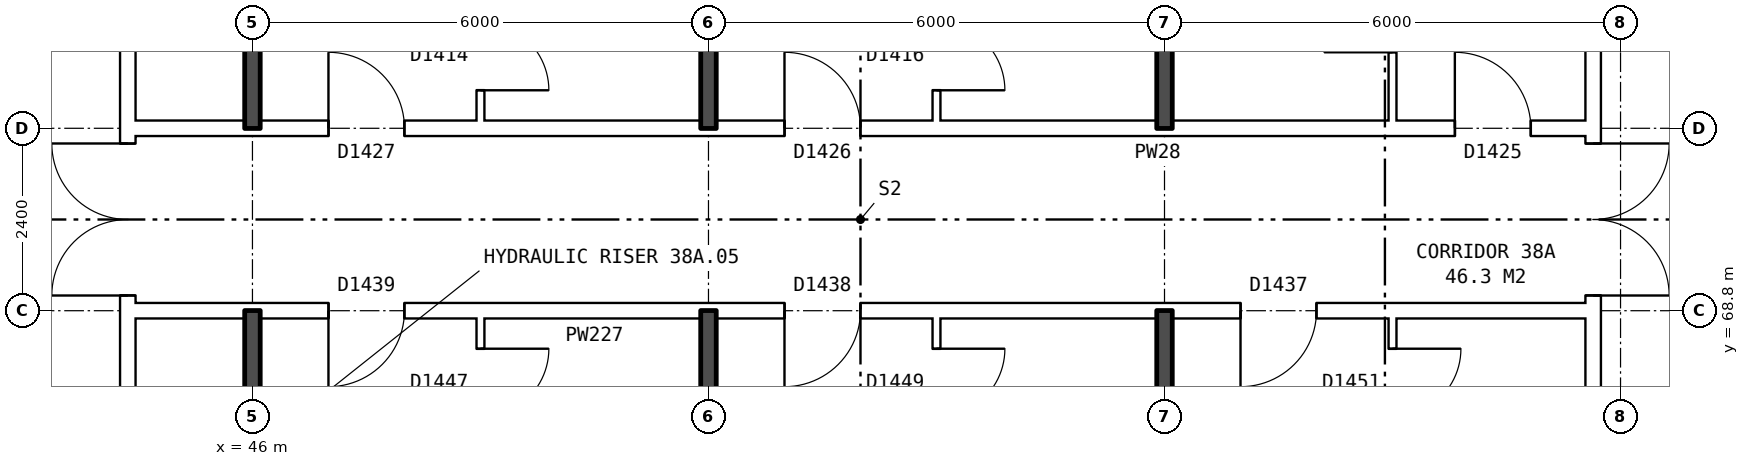
"""IFC4 building model, lengths in metres.
Left out: names, types, materials, properties, quantities, classifications, styles, units other than length and angle.
Written with IfcOpenShell. Run it as: python <this file> out.ifc"""

import sys

from ifc_helpers import new_model, si_unit, direction, frame, frame_2d, origin, place, context, subcontext, project, spatial, rectangle, extrude, element, fill, save


model = new_model("IFC4")
c1 = context("Model", 3, precision=1e-05, world=origin(), true_north=direction((0.0, 1.0)))
c2 = subcontext(c1, "Body", "Model", "MODEL_VIEW")
j1 = project(units=[si_unit("LENGTHUNIT", "METRE"), si_unit("PLANEANGLEUNIT", "RADIAN")], contexts=[c1])
p1 = place(None, origin())
s1 = spatial("IfcSite", under=j1, at=p1, CompositionType="ELEMENT")
p2 = place(p1, origin())
s2 = spatial("IfcBuilding", under=s1, at=p2, CompositionType="ELEMENT")
p3 = place(p2, frame((0.0, 0.0, 136.1)))
s3 = spatial("IfcBuildingStorey", under=s2, at=p3, CompositionType="ELEMENT", Elevation=136.1)
p4 = place(p3, frame((63.64, 63.9, 0.0), z_axis=(0.0, 0.0, 1.0), x_axis=(0.0, 1.0, 0.0)))
e1 = element("IfcWall", 1, at=p4, inside=s3, PredefinedType="PARTITIONING", context=c2, shape_type="SweptSolid", body=[
    extrude(rectangle(XDim=12.2, YDim=0.2, at=frame_2d((6.1, 0.0))), origin(), (0.0, 0.0, 1.0), 2.85),
])
p5 = place(p4, frame((5.1, 0.0, 0.0)))
e2 = element("IfcOpeningElement", 2, at=p5, cuts=e1, PredefinedType="OPENING", context=c2, shape_type="SweptSolid", body=[
    extrude(rectangle(XDim=2.0, YDim=2.1, at=frame_2d((1.0, 1.05))), frame((0.0, 0.11, 0.0), z_axis=(0.0, -1.0, 0.0), x_axis=(1.0, 0.0, 0.0)), (0.0, 0.0, 1.0), 0.22),
])
p6 = place(p3, frame((44.36, 63.9, 0.0), z_axis=(0.0, 0.0, 1.0), x_axis=(0.0, 1.0, 0.0)))
e3 = element("IfcWall", 3, at=p6, inside=s3, PredefinedType="PARTITIONING", context=c2, shape_type="SweptSolid", body=[
    extrude(rectangle(XDim=12.2, YDim=0.2, at=frame_2d((6.1, 0.0))), origin(), (0.0, 0.0, 1.0), 2.85),
])
p7 = place(p6, frame((5.1, 0.0, 0.0)))
e4 = element("IfcOpeningElement", 4, at=p7, cuts=e3, PredefinedType="OPENING", context=c2, shape_type="SweptSolid", body=[
    extrude(rectangle(XDim=2.0, YDim=2.1, at=frame_2d((1.0, 1.05))), frame((0.0, 0.11, 0.0), z_axis=(0.0, -1.0, 0.0), x_axis=(1.0, 0.0, 0.0)), (0.0, 0.0, 1.0), 0.22),
])
p8 = place(p3, frame((44.36, 68.8, 0.0), z_axis=(0.0, 0.0, 1.0), x_axis=(1.0, 0.0, 0.0)))
e5 = element("IfcWall", 5, at=p8, inside=s3, PredefinedType="PARTITIONING", context=c2, shape_type="SweptSolid", body=[
    extrude(rectangle(XDim=19.28, YDim=0.2, at=frame_2d((9.64, 0.0))), origin(), (0.0, 0.0, 1.0), 2.85),
])
p9 = place(p8, frame((14.64, 0.0, 0.0)))
e6 = element("IfcOpeningElement", 6, at=p9, cuts=e5, PredefinedType="OPENING", context=c2, shape_type="SweptSolid", body=[
    extrude(rectangle(XDim=1.0, YDim=2.1, at=frame_2d((0.5, 1.05))), frame((0.0, 0.11, 0.0), z_axis=(0.0, -1.0, 0.0), x_axis=(1.0, 0.0, 0.0)), (0.0, 0.0, 1.0), 0.22),
])
p10 = place(p8, frame((8.64, 0.0, 0.0)))
e7 = element("IfcOpeningElement", 7, at=p10, cuts=e5, PredefinedType="OPENING", context=c2, shape_type="SweptSolid", body=[
    extrude(rectangle(XDim=1.0, YDim=2.1, at=frame_2d((0.5, 1.05))), frame((0.0, 0.11, 0.0), z_axis=(0.0, -1.0, 0.0), x_axis=(1.0, 0.0, 0.0)), (0.0, 0.0, 1.0), 0.22),
])
p11 = place(p8, frame((2.64, 0.0, 0.0)))
e8 = element("IfcOpeningElement", 8, at=p11, cuts=e5, PredefinedType="OPENING", context=c2, shape_type="SweptSolid", body=[
    extrude(rectangle(XDim=1.0, YDim=2.1, at=frame_2d((0.5, 1.05))), frame((0.0, 0.11, 0.0), z_axis=(0.0, -1.0, 0.0), x_axis=(1.0, 0.0, 0.0)), (0.0, 0.0, 1.0), 0.22),
])
p12 = place(p3, frame((44.36, 71.2, 0.0), z_axis=(0.0, 0.0, 1.0), x_axis=(1.0, 0.0, 0.0)))
e9 = element("IfcWall", 9, at=p12, inside=s3, PredefinedType="PARTITIONING", context=c2, shape_type="SweptSolid", body=[
    extrude(rectangle(XDim=19.28, YDim=0.2, at=frame_2d((9.64, 0.0))), origin(), (0.0, 0.0, 1.0), 2.85),
])
p13 = place(p12, frame((17.46, 0.0, 0.0)))
e10 = element("IfcOpeningElement", 10, at=p13, cuts=e9, PredefinedType="OPENING", context=c2, shape_type="SweptSolid", body=[
    extrude(rectangle(XDim=1.0, YDim=2.1, at=frame_2d((0.5, 1.05))), frame((0.0, 0.11, 0.0), z_axis=(0.0, -1.0, 0.0), x_axis=(1.0, 0.0, 0.0)), (0.0, 0.0, 1.0), 0.22),
])
p14 = place(p12, frame((8.64, 0.0, 0.0)))
e11 = element("IfcOpeningElement", 11, at=p14, cuts=e9, PredefinedType="OPENING", context=c2, shape_type="SweptSolid", body=[
    extrude(rectangle(XDim=1.0, YDim=2.1, at=frame_2d((0.5, 1.05))), frame((0.0, 0.11, 0.0), z_axis=(0.0, -1.0, 0.0), x_axis=(1.0, 0.0, 0.0)), (0.0, 0.0, 1.0), 0.22),
])
p15 = place(p12, frame((2.64, 0.0, 0.0)))
e12 = element("IfcOpeningElement", 12, at=p15, cuts=e9, PredefinedType="OPENING", context=c2, shape_type="SweptSolid", body=[
    extrude(rectangle(XDim=1.0, YDim=2.1, at=frame_2d((0.5, 1.05))), frame((0.0, 0.11, 0.0), z_axis=(0.0, -1.0, 0.0), x_axis=(1.0, 0.0, 0.0)), (0.0, 0.0, 1.0), 0.22),
])
for number, where, z_axis, x_axis in (
    (13, (46.0, 63.8, 0.0), (0.0, 0.0, 1.0), (0.0, 1.0, 0.0)),
    (14, (46.0, 71.2, 0.0), (0.0, 0.0, 1.0), (0.0, 1.0, 0.0)),
):
    element("IfcWall", number, at=place(p3, frame(where, z_axis=z_axis, x_axis=x_axis)), inside=s3, PredefinedType="SOLIDWALL", context=c2, shape_type="SweptSolid", body=[
        extrude(rectangle(XDim=5.0, YDim=0.2, at=frame_2d((2.5, 0.0))), origin(), (0.0, 0.0, 1.0), 2.85),
    ])
p16 = place(p3, frame((49.0, 54.36, 0.0), z_axis=(0.0, 0.0, 1.0), x_axis=(0.0, 1.0, 0.0)))
e15 = element("IfcWall", 15, at=p16, inside=s3, PredefinedType="PARTITIONING", context=c2, shape_type="SweptSolid", body=[
    extrude(rectangle(XDim=14.34, YDim=0.1, at=frame_2d((7.17, 0.0))), origin(), (0.0, 0.0, 1.0), 2.85),
])
p17 = place(p16, frame((6.7, 0.0, 0.0)))
e16 = element("IfcOpeningElement", 16, at=p17, cuts=e15, PredefinedType="OPENING", context=c2, shape_type="SweptSolid", body=[
    extrude(rectangle(XDim=0.9, YDim=2.1, at=frame_2d((0.45, 1.05))), frame((0.0, 0.06, 0.0), z_axis=(0.0, -1.0, 0.0), x_axis=(1.0, 0.0, 0.0)), (0.0, 0.0, 1.0), 0.12),
])
p18 = place(p16, frame((13.04, 0.0, 0.0)))
e17 = element("IfcOpeningElement", 17, at=p18, cuts=e15, PredefinedType="OPENING", context=c2, shape_type="SweptSolid", body=[
    extrude(rectangle(XDim=0.9, YDim=2.1, at=frame_2d((0.45, 1.05))), frame((0.0, 0.06, 0.0), z_axis=(0.0, -1.0, 0.0), x_axis=(1.0, 0.0, 0.0)), (0.0, 0.0, 1.0), 0.12),
])
p19 = place(p3, frame((49.0, 71.3, 0.0), z_axis=(0.0, 0.0, 1.0), x_axis=(0.0, 1.0, 0.0)))
e18 = element("IfcWall", 18, at=p19, inside=s3, PredefinedType="PARTITIONING", context=c2, shape_type="SweptSolid", body=[
    extrude(rectangle(XDim=14.34, YDim=0.1, at=frame_2d((7.17, 0.0))), origin(), (0.0, 0.0, 1.0), 2.85),
])
p20 = place(p19, frame((7.94, 0.0, 0.0)))
e19 = element("IfcOpeningElement", 19, at=p20, cuts=e18, PredefinedType="OPENING", context=c2, shape_type="SweptSolid", body=[
    extrude(rectangle(XDim=0.9, YDim=2.1, at=frame_2d((0.45, 1.05))), frame((0.0, 0.06, 0.0), z_axis=(0.0, -1.0, 0.0), x_axis=(1.0, 0.0, 0.0)), (0.0, 0.0, 1.0), 0.12),
])
p21 = place(p19, frame((0.4, 0.0, 0.0)))
e20 = element("IfcOpeningElement", 20, at=p21, cuts=e18, PredefinedType="OPENING", context=c2, shape_type="SweptSolid", body=[
    extrude(rectangle(XDim=0.9, YDim=2.1, at=frame_2d((0.45, 1.05))), frame((0.0, 0.06, 0.0), z_axis=(0.0, -1.0, 0.0), x_axis=(1.0, 0.0, 0.0)), (0.0, 0.0, 1.0), 0.12),
])
for number, where, z_axis, x_axis in (
    (21, (52.0, 54.36, 0.0), (0.0, 0.0, 1.0), (0.0, 1.0, 0.0)),
    (22, (52.0, 71.2, 0.0), (0.0, 0.0, 1.0), (0.0, 1.0, 0.0)),
):
    element("IfcWall", number, at=place(p3, frame(where, z_axis=z_axis, x_axis=x_axis)), inside=s3, PredefinedType="SOLIDWALL", context=c2, shape_type="SweptSolid", body=[
        extrude(rectangle(XDim=14.44, YDim=0.2, at=frame_2d((7.22, 0.0))), origin(), (0.0, 0.0, 1.0), 2.85),
    ])
p22 = place(p3, frame((55.0, 54.36, 0.0), z_axis=(0.0, 0.0, 1.0), x_axis=(0.0, 1.0, 0.0)))
e23 = element("IfcWall", 23, at=p22, inside=s3, PredefinedType="PARTITIONING", context=c2, shape_type="SweptSolid", body=[
    extrude(rectangle(XDim=14.34, YDim=0.1, at=frame_2d((7.17, 0.0))), origin(), (0.0, 0.0, 1.0), 2.85),
])
p23 = place(p22, frame((6.7, 0.0, 0.0)))
e24 = element("IfcOpeningElement", 24, at=p23, cuts=e23, PredefinedType="OPENING", context=c2, shape_type="SweptSolid", body=[
    extrude(rectangle(XDim=0.9, YDim=2.1, at=frame_2d((0.45, 1.05))), frame((0.0, 0.06, 0.0), z_axis=(0.0, -1.0, 0.0), x_axis=(1.0, 0.0, 0.0)), (0.0, 0.0, 1.0), 0.12),
])
p24 = place(p22, frame((13.04, 0.0, 0.0)))
e25 = element("IfcOpeningElement", 25, at=p24, cuts=e23, PredefinedType="OPENING", context=c2, shape_type="SweptSolid", body=[
    extrude(rectangle(XDim=0.9, YDim=2.1, at=frame_2d((0.45, 1.05))), frame((0.0, 0.06, 0.0), z_axis=(0.0, -1.0, 0.0), x_axis=(1.0, 0.0, 0.0)), (0.0, 0.0, 1.0), 0.12),
])
p25 = place(p3, frame((55.0, 71.3, 0.0), z_axis=(0.0, 0.0, 1.0), x_axis=(0.0, 1.0, 0.0)))
e26 = element("IfcWall", 26, at=p25, inside=s3, PredefinedType="PARTITIONING", context=c2, shape_type="SweptSolid", body=[
    extrude(rectangle(XDim=14.34, YDim=0.1, at=frame_2d((7.17, 0.0))), origin(), (0.0, 0.0, 1.0), 2.85),
])
p26 = place(p25, frame((6.74, 0.0, 0.0)))
e27 = element("IfcOpeningElement", 27, at=p26, cuts=e26, PredefinedType="OPENING", context=c2, shape_type="SweptSolid", body=[
    extrude(rectangle(XDim=0.9, YDim=2.1, at=frame_2d((0.45, 1.05))), frame((0.0, 0.06, 0.0), z_axis=(0.0, -1.0, 0.0), x_axis=(1.0, 0.0, 0.0)), (0.0, 0.0, 1.0), 0.12),
])
p27 = place(p25, frame((0.4, 0.0, 0.0)))
e28 = element("IfcOpeningElement", 28, at=p27, cuts=e26, PredefinedType="OPENING", context=c2, shape_type="SweptSolid", body=[
    extrude(rectangle(XDim=0.9, YDim=2.1, at=frame_2d((0.45, 1.05))), frame((0.0, 0.06, 0.0), z_axis=(0.0, -1.0, 0.0), x_axis=(1.0, 0.0, 0.0)), (0.0, 0.0, 1.0), 0.12),
])
for number, where, z_axis, x_axis in (
    (29, (58.0, 54.36, 0.0), (0.0, 0.0, 1.0), (0.0, 1.0, 0.0)),
    (30, (58.0, 71.2, 0.0), (0.0, 0.0, 1.0), (0.0, 1.0, 0.0)),
):
    element("IfcWall", number, at=place(p3, frame(where, z_axis=z_axis, x_axis=x_axis)), inside=s3, PredefinedType="SOLIDWALL", context=c2, shape_type="SweptSolid", body=[
        extrude(rectangle(XDim=14.44, YDim=0.2, at=frame_2d((7.22, 0.0))), origin(), (0.0, 0.0, 1.0), 2.85),
    ])
p28 = place(p3, frame((61.0, 54.36, 0.0), z_axis=(0.0, 0.0, 1.0), x_axis=(0.0, 1.0, 0.0)))
e31 = element("IfcWall", 31, at=p28, inside=s3, PredefinedType="PARTITIONING", context=c2, shape_type="SweptSolid", body=[
    extrude(rectangle(XDim=14.34, YDim=0.1, at=frame_2d((7.17, 0.0))), origin(), (0.0, 0.0, 1.0), 2.85),
])
p29 = place(p28, frame((4.2, 0.0, 0.0)))
e32 = element("IfcOpeningElement", 32, at=p29, cuts=e31, PredefinedType="OPENING", context=c2, shape_type="SweptSolid", body=[
    extrude(rectangle(XDim=0.9, YDim=2.1, at=frame_2d((0.45, 1.05))), frame((0.0, 0.06, 0.0), z_axis=(0.0, -1.0, 0.0), x_axis=(1.0, 0.0, 0.0)), (0.0, 0.0, 1.0), 0.12),
])
p30 = place(p28, frame((13.04, 0.0, 0.0)))
e33 = element("IfcOpeningElement", 33, at=p30, cuts=e31, PredefinedType="OPENING", context=c2, shape_type="SweptSolid", body=[
    extrude(rectangle(XDim=0.9, YDim=2.1, at=frame_2d((0.45, 1.05))), frame((0.0, 0.06, 0.0), z_axis=(0.0, -1.0, 0.0), x_axis=(1.0, 0.0, 0.0)), (0.0, 0.0, 1.0), 0.12),
])
p31 = place(p3, frame((61.0, 71.3, 0.0), z_axis=(0.0, 0.0, 1.0), x_axis=(0.0, 1.0, 0.0)))
e34 = element("IfcWall", 34, at=p31, inside=s3, PredefinedType="PARTITIONING", context=c2, shape_type="SweptSolid", body=[
    extrude(rectangle(XDim=14.34, YDim=0.1, at=frame_2d((7.17, 0.0))), origin(), (0.0, 0.0, 1.0), 2.85),
])
p32 = place(p31, frame((7.94, 0.0, 0.0)))
e35 = element("IfcOpeningElement", 35, at=p32, cuts=e34, PredefinedType="OPENING", context=c2, shape_type="SweptSolid", body=[
    extrude(rectangle(XDim=0.9, YDim=2.1, at=frame_2d((0.45, 1.05))), frame((0.0, 0.06, 0.0), z_axis=(0.0, -1.0, 0.0), x_axis=(1.0, 0.0, 0.0)), (0.0, 0.0, 1.0), 0.12),
])
p33 = place(p31, frame((0.9, 0.0, 0.0)))
e36 = element("IfcOpeningElement", 36, at=p33, cuts=e34, PredefinedType="OPENING", context=c2, shape_type="SweptSolid", body=[
    extrude(rectangle(XDim=0.9, YDim=2.1, at=frame_2d((0.45, 1.05))), frame((0.0, 0.06, 0.0), z_axis=(0.0, -1.0, 0.0), x_axis=(1.0, 0.0, 0.0)), (0.0, 0.0, 1.0), 0.12),
])
p34 = place(p5, frame((2.0, 0.0, 0.0), z_axis=(0.0, 0.0, 1.0), x_axis=(-1.0, 0.0, 0.0)))
e37 = element("IfcDoor", 37, at=p34, inside=s3, OperationType="DOUBLE_DOOR_SINGLE_SWING", PredefinedType="DOOR", context=c2, shape_type="SweptSolid", body=[
    extrude(rectangle(XDim=2.0, YDim=2.1, at=frame_2d((1.0, 1.05))), frame((0.0, 0.025, 0.0), z_axis=(0.0, -1.0, 0.0), x_axis=(1.0, 0.0, 0.0)), (0.0, 0.0, 1.0), 0.05),
])
fill(e2, e37)
p35 = place(p7, origin())
e38 = element("IfcDoor", 38, at=p35, inside=s3, OperationType="DOUBLE_DOOR_SINGLE_SWING", PredefinedType="DOOR", context=c2, shape_type="SweptSolid", body=[
    extrude(rectangle(XDim=2.0, YDim=2.1, at=frame_2d((1.0, 1.05))), frame((0.0, 0.025, 0.0), z_axis=(0.0, -1.0, 0.0), x_axis=(1.0, 0.0, 0.0)), (0.0, 0.0, 1.0), 0.05),
])
fill(e4, e38)
p36 = place(p9, frame((1.0, 0.0, 0.0), z_axis=(0.0, 0.0, 1.0), x_axis=(-1.0, 0.0, 0.0)))
e39 = element("IfcDoor", 39, at=p36, inside=s3, OperationType="SINGLE_SWING_RIGHT", PredefinedType="DOOR", context=c2, shape_type="SweptSolid", body=[
    extrude(rectangle(XDim=1.0, YDim=2.1, at=frame_2d((0.5, 1.05))), frame((0.0, 0.025, 0.0), z_axis=(0.0, -1.0, 0.0), x_axis=(1.0, 0.0, 0.0)), (0.0, 0.0, 1.0), 0.05),
])
fill(e6, e39)
p37 = place(p30, frame((0.9, 0.0, 0.0), z_axis=(0.0, 0.0, 1.0), x_axis=(-1.0, 0.0, 0.0)))
e40 = element("IfcDoor", 40, at=p37, inside=s3, OperationType="SINGLE_SWING_LEFT", PredefinedType="DOOR", context=c2, shape_type="SweptSolid", body=[
    extrude(rectangle(XDim=0.9, YDim=2.1, at=frame_2d((0.45, 1.05))), frame((0.0, 0.025, 0.0), z_axis=(0.0, -1.0, 0.0), x_axis=(1.0, 0.0, 0.0)), (0.0, 0.0, 1.0), 0.05),
])
fill(e33, e40)
p38 = place(p10, frame((1.0, 0.0, 0.0), z_axis=(0.0, 0.0, 1.0), x_axis=(-1.0, 0.0, 0.0)))
e41 = element("IfcDoor", 41, at=p38, inside=s3, OperationType="SINGLE_SWING_RIGHT", PredefinedType="DOOR", context=c2, shape_type="SweptSolid", body=[
    extrude(rectangle(XDim=1.0, YDim=2.1, at=frame_2d((0.5, 1.05))), frame((0.0, 0.025, 0.0), z_axis=(0.0, -1.0, 0.0), x_axis=(1.0, 0.0, 0.0)), (0.0, 0.0, 1.0), 0.05),
])
fill(e7, e41)
p39 = place(p24, frame((0.9, 0.0, 0.0), z_axis=(0.0, 0.0, 1.0), x_axis=(-1.0, 0.0, 0.0)))
e42 = element("IfcDoor", 42, at=p39, inside=s3, OperationType="SINGLE_SWING_LEFT", PredefinedType="DOOR", context=c2, shape_type="SweptSolid", body=[
    extrude(rectangle(XDim=0.9, YDim=2.1, at=frame_2d((0.45, 1.05))), frame((0.0, 0.025, 0.0), z_axis=(0.0, -1.0, 0.0), x_axis=(1.0, 0.0, 0.0)), (0.0, 0.0, 1.0), 0.05),
])
fill(e25, e42)
p40 = place(p11, frame((1.0, 0.0, 0.0), z_axis=(0.0, 0.0, 1.0), x_axis=(-1.0, 0.0, 0.0)))
e43 = element("IfcDoor", 43, at=p40, inside=s3, OperationType="SINGLE_SWING_RIGHT", PredefinedType="DOOR", context=c2, shape_type="SweptSolid", body=[
    extrude(rectangle(XDim=1.0, YDim=2.1, at=frame_2d((0.5, 1.05))), frame((0.0, 0.025, 0.0), z_axis=(0.0, -1.0, 0.0), x_axis=(1.0, 0.0, 0.0)), (0.0, 0.0, 1.0), 0.05),
])
fill(e8, e43)
p41 = place(p18, frame((0.9, 0.0, 0.0), z_axis=(0.0, 0.0, 1.0), x_axis=(-1.0, 0.0, 0.0)))
e44 = element("IfcDoor", 44, at=p41, inside=s3, OperationType="SINGLE_SWING_LEFT", PredefinedType="DOOR", context=c2, shape_type="SweptSolid", body=[
    extrude(rectangle(XDim=0.9, YDim=2.1, at=frame_2d((0.45, 1.05))), frame((0.0, 0.025, 0.0), z_axis=(0.0, -1.0, 0.0), x_axis=(1.0, 0.0, 0.0)), (0.0, 0.0, 1.0), 0.05),
])
fill(e17, e44)
p42 = place(p13, origin())
e45 = element("IfcDoor", 45, at=p42, inside=s3, OperationType="SINGLE_SWING_LEFT", PredefinedType="DOOR", context=c2, shape_type="SweptSolid", body=[
    extrude(rectangle(XDim=1.0, YDim=2.1, at=frame_2d((0.5, 1.05))), frame((0.0, 0.025, 0.0), z_axis=(0.0, -1.0, 0.0), x_axis=(1.0, 0.0, 0.0)), (0.0, 0.0, 1.0), 0.05),
])
fill(e10, e45)
p43 = place(p14, origin())
e46 = element("IfcDoor", 46, at=p43, inside=s3, OperationType="SINGLE_SWING_LEFT", PredefinedType="DOOR", context=c2, shape_type="SweptSolid", body=[
    extrude(rectangle(XDim=1.0, YDim=2.1, at=frame_2d((0.5, 1.05))), frame((0.0, 0.025, 0.0), z_axis=(0.0, -1.0, 0.0), x_axis=(1.0, 0.0, 0.0)), (0.0, 0.0, 1.0), 0.05),
])
fill(e11, e46)
p44 = place(p27, frame((0.9, 0.0, 0.0), z_axis=(0.0, 0.0, 1.0), x_axis=(-1.0, 0.0, 0.0)))
e47 = element("IfcDoor", 47, at=p44, inside=s3, OperationType="SINGLE_SWING_RIGHT", PredefinedType="DOOR", context=c2, shape_type="SweptSolid", body=[
    extrude(rectangle(XDim=0.9, YDim=2.1, at=frame_2d((0.45, 1.05))), frame((0.0, 0.025, 0.0), z_axis=(0.0, -1.0, 0.0), x_axis=(1.0, 0.0, 0.0)), (0.0, 0.0, 1.0), 0.05),
])
fill(e28, e47)
p45 = place(p15, origin())
e48 = element("IfcDoor", 48, at=p45, inside=s3, OperationType="SINGLE_SWING_LEFT", PredefinedType="DOOR", context=c2, shape_type="SweptSolid", body=[
    extrude(rectangle(XDim=1.0, YDim=2.1, at=frame_2d((0.5, 1.05))), frame((0.0, 0.025, 0.0), z_axis=(0.0, -1.0, 0.0), x_axis=(1.0, 0.0, 0.0)), (0.0, 0.0, 1.0), 0.05),
])
fill(e12, e48)
p46 = place(p21, frame((0.9, 0.0, 0.0), z_axis=(0.0, 0.0, 1.0), x_axis=(-1.0, 0.0, 0.0)))
e49 = element("IfcDoor", 49, at=p46, inside=s3, OperationType="SINGLE_SWING_RIGHT", PredefinedType="DOOR", context=c2, shape_type="SweptSolid", body=[
    extrude(rectangle(XDim=0.9, YDim=2.1, at=frame_2d((0.45, 1.05))), frame((0.0, 0.025, 0.0), z_axis=(0.0, -1.0, 0.0), x_axis=(1.0, 0.0, 0.0)), (0.0, 0.0, 1.0), 0.05),
])
fill(e20, e49)
save(model, sys.argv[1])
